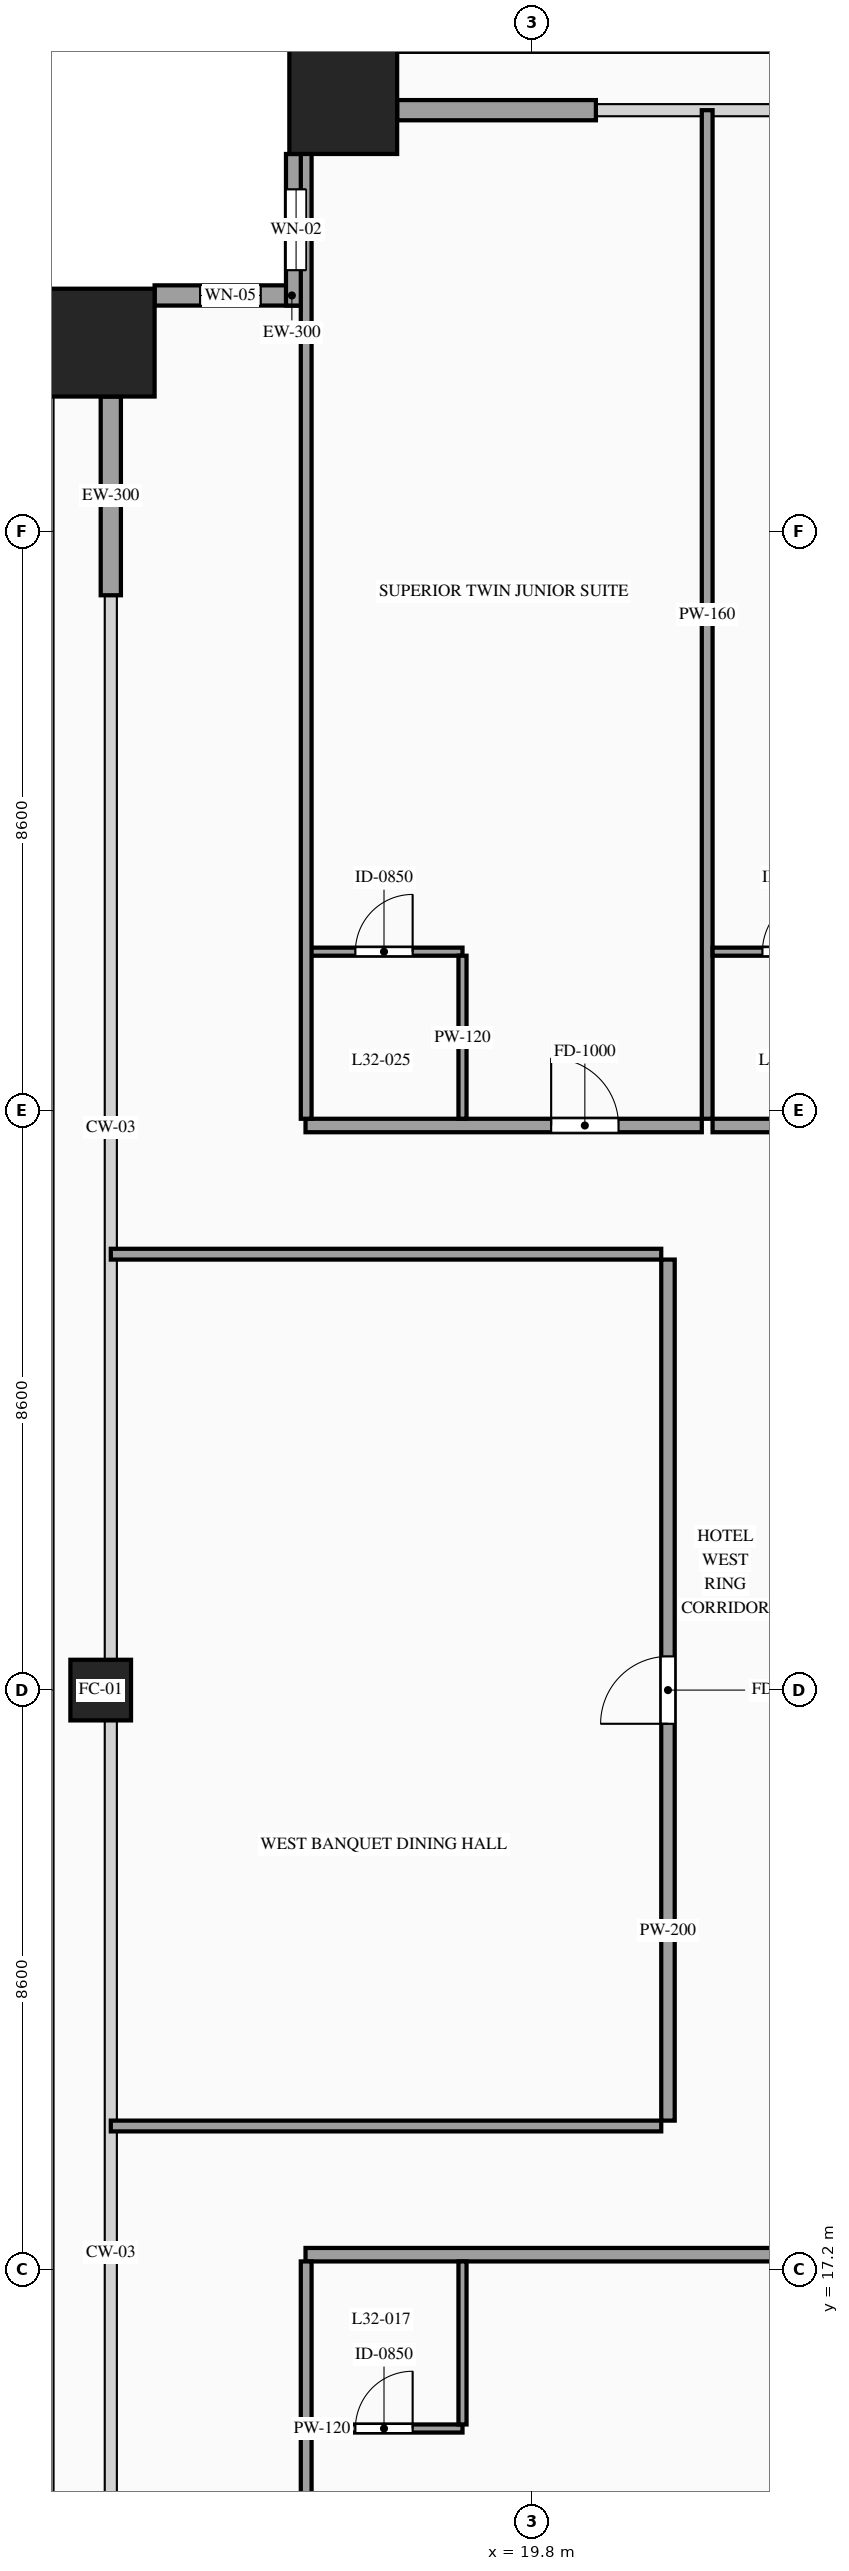
"""IFC4 building model, lengths in metres.
Left out: names, types, materials, properties, quantities, classifications, styles, units other than length and angle.
Written with IfcOpenShell. Run it as: python <this file> out.ifc"""

import sys

from ifc_helpers import new_model, si_unit, direction, frame, frame_2d, origin, origin_2d, place, context, subcontext, project, spatial, rectangle, hollow_rectangle, extrude, source, transform, mapped, element, fill, save


model = new_model("IFC4")
c1 = context("Model", 3, precision=1e-05, world=origin(), true_north=direction((0.0, 1.0)))
c2 = subcontext(c1, "Body", "Model", "MODEL_VIEW")
j1 = project(units=[si_unit("LENGTHUNIT", "METRE"), si_unit("PLANEANGLEUNIT", "RADIAN")], contexts=[c1])
p1 = place(None, origin())
s1 = spatial("IfcSite", under=j1, at=p1, CompositionType="ELEMENT")
p2 = place(p1, origin())
s2 = spatial("IfcBuilding", under=s1, at=p2, CompositionType="ELEMENT")
p3 = place(p2, frame((0.0, 0.0, 122.6)))
s3 = spatial("IfcBuildingStorey", under=s2, at=p3, CompositionType="ELEMENT", Elevation=122.6)
m1 = source(origin(), c2, "Body", "SweptSolid", [
    extrude(hollow_rectangle(XDim=1.6, YDim=1.6, WallThickness=0.07, at=origin_2d()), origin(), (0.0, 0.0, 1.0), 3.6),
])
p4 = place(p3, frame((17.0, 49.4, 0.0), z_axis=(0.0, 0.0, 1.0), x_axis=(1.0, 0.0, 0.0)))
e1 = element("IfcColumn", 1, at=p4, inside=s3, PredefinedType="COLUMN", context=c2, shape_type="MappedRepresentation", body=[
    mapped(m1, transform((0.0, 0.0, 0.0), scale=1.0)),
])
m2 = source(origin(), c2, "Body", "SweptSolid", [
    extrude(hollow_rectangle(XDim=0.9, YDim=0.9, WallThickness=0.042, at=origin_2d()), origin(), (0.0, 0.0, 1.0), 3.6),
])
p5 = place(p3, frame((13.4, 25.8, 0.0), z_axis=(0.0, 0.0, 1.0), x_axis=(1.0, 0.0, 0.0)))
e2 = element("IfcColumn", 2, at=p5, inside=s3, PredefinedType="COLUMN", context=c2, shape_type="MappedRepresentation", body=[
    mapped(m2, transform((0.0, 0.0, 0.0), scale=1.0)),
])
p6 = place(p3, frame((13.4, 45.8, 0.0), z_axis=(0.0, 0.0, 1.0), x_axis=(1.0, 0.0, 0.0)))
e3 = element("IfcColumn", 3, at=p6, inside=s3, PredefinedType="COLUMN", context=c2, shape_type="MappedRepresentation", body=[
    mapped(m1, transform((0.0, 0.0, 0.0), scale=1.0)),
])
p7 = place(p3, frame((16.45, 46.5, 0.0), z_axis=(0.0, 0.0, 1.0), x_axis=(-1.0, 0.0, 0.0)))
e4 = element("IfcWall", 4, at=p7, inside=s3, PredefinedType="SOLIDWALL", context=c2, shape_type="SweptSolid", body=[
    extrude(rectangle(XDim=2.25, YDim=0.3, at=frame_2d((1.125, 0.0))), origin(), (0.0, 0.0, 1.0), 3.38),
])
p8 = place(p7, frame((0.675, 0.0, 0.85)))
e5 = element("IfcOpeningElement", 5, at=p8, cuts=e4, PredefinedType="OPENING", context=c2, shape_type="SweptSolid", body=[
    extrude(rectangle(XDim=0.9, YDim=1.5, at=frame_2d((0.45, 0.75))), frame((0.0, 0.165, 0.0), z_axis=(0.0, -1.0, 0.0), x_axis=(1.0, 0.0, 0.0)), (0.0, 0.0, 1.0), 0.33),
])
p9 = place(p3, frame((16.3, 48.6, 0.0), z_axis=(0.0, 0.0, 1.0), x_axis=(0.0, -1.0, 0.0)))
e6 = element("IfcWall", 6, at=p9, inside=s3, PredefinedType="SOLIDWALL", context=c2, shape_type="SweptSolid", body=[
    extrude(rectangle(XDim=2.25, YDim=0.3, at=frame_2d((1.125, 0.0))), origin(), (0.0, 0.0, 1.0), 3.38),
])
p10 = place(p9, frame((0.525, 0.0, 0.85)))
e7 = element("IfcOpeningElement", 7, at=p10, cuts=e6, PredefinedType="OPENING", context=c2, shape_type="SweptSolid", body=[
    extrude(rectangle(XDim=1.2, YDim=2.1, at=frame_2d((0.6, 1.05))), frame((0.0, 0.165, 0.0), z_axis=(0.0, -1.0, 0.0), x_axis=(1.0, 0.0, 0.0)), (0.0, 0.0, 1.0), 0.33),
])
m3 = source(origin(), c2, "Body", "SweptSolid", [
    extrude(rectangle(XDim=2.95, YDim=0.3, at=frame_2d((1.475, 0.0))), origin(), (0.0, 0.0, 1.0), 2.775),
])
for number, where, z_axis, x_axis in (
    (8, (17.8, 49.25, 0.0), (0.0, 0.0, 1.0), (1.0, 0.0, 0.0)),
    (9, (13.55, 42.05, 0.0), (0.0, 0.0, 1.0), (0.0, 1.0, 0.0)),
):
    element("IfcWall", number, at=place(p3, frame(where, z_axis=z_axis, x_axis=x_axis)), inside=s3, PredefinedType="SOLIDWALL", context=c2, shape_type="MappedRepresentation", body=[
        mapped(m3, transform((0.0, 0.0, 0.0), scale=1.0)),
    ])
p11 = place(p3, frame((16.44, 17.42, 0.0), z_axis=(0.0, 0.0, 1.0), x_axis=(1.0, 0.0, 0.0)))
e10 = element("IfcWall", 10, at=p11, inside=s3, PredefinedType="PARTITIONING", context=c2, shape_type="SweptSolid", body=[
    extrude(rectangle(XDim=12.462, YDim=0.2, at=frame_2d((6.231, 0.0))), origin(), (0.0, 0.0, 1.0), 3.38),
])
p12 = place(p11, frame((6.936, 0.0, 0.0)))
e11 = element("IfcOpeningElement", 11, at=p12, cuts=e10, PredefinedType="OPENING", context=c2, shape_type="SweptSolid", body=[
    extrude(rectangle(XDim=1.0, YDim=2.2, at=frame_2d((0.5, 1.1))), frame((0.0, 0.115, 0.0), z_axis=(0.0, -1.0, 0.0), x_axis=(1.0, 0.0, 0.0)), (0.0, 0.0, 1.0), 0.23),
])
p13 = place(p3, frame((16.44, 14.84, 0.0), z_axis=(0.0, 0.0, 1.0), x_axis=(1.0, 0.0, 0.0)))
e12 = element("IfcWall", 12, at=p13, inside=s3, PredefinedType="PARTITIONING", context=c2, shape_type="SweptSolid", body=[
    extrude(rectangle(XDim=2.33, YDim=0.12, at=frame_2d((1.165, 0.0))), origin(), (0.0, 0.0, 1.0), 3.38),
])
p14 = place(p13, frame((0.74, 0.0, 0.0)))
e13 = element("IfcOpeningElement", 13, at=p14, cuts=e12, PredefinedType="OPENING", context=c2, shape_type="SweptSolid", body=[
    extrude(rectangle(XDim=0.85, YDim=2.1, at=frame_2d((0.425, 1.05))), frame((0.0, 0.075, 0.0), z_axis=(0.0, -1.0, 0.0), x_axis=(1.0, 0.0, 0.0)), (0.0, 0.0, 1.0), 0.15),
])
m4 = source(origin(), c2, "Body", "SweptSolid", [
    extrude(rectangle(XDim=2.42, YDim=0.12, at=frame_2d((1.21, 0.0))), origin(), (0.0, 0.0, 1.0), 3.38),
])
p15 = place(p3, frame((18.77, 14.9, 0.0), z_axis=(0.0, 0.0, 1.0), x_axis=(0.0, 1.0, 0.0)))
e14 = element("IfcWall", 14, at=p15, inside=s3, PredefinedType="PARTITIONING", context=c2, shape_type="MappedRepresentation", body=[
    mapped(m4, transform((0.0, 0.0, 0.0), scale=1.0)),
])
m5 = source(origin(), c2, "Body", "SweptSolid", [
    extrude(rectangle(XDim=14.82, YDim=0.16, at=frame_2d((7.41, 0.0))), origin(), (0.0, 0.0, 1.0), 3.38),
])
p16 = place(p3, frame((16.45, 2.5, 0.0), z_axis=(0.0, 0.0, 1.0), x_axis=(0.0, 1.0, 0.0)))
e15 = element("IfcWall", 15, at=p16, inside=s3, PredefinedType="PARTITIONING", context=c2, shape_type="MappedRepresentation", body=[
    mapped(m5, transform((0.0, 0.0, 0.0), scale=1.0)),
])
p17 = place(p3, frame((16.44, 34.18, 0.0), z_axis=(0.0, 0.0, 1.0), x_axis=(1.0, 0.0, 0.0)))
e16 = element("IfcWall", 16, at=p17, inside=s3, PredefinedType="PARTITIONING", context=c2, shape_type="SweptSolid", body=[
    extrude(rectangle(XDim=5.882, YDim=0.2, at=frame_2d((2.941, 0.0))), origin(), (0.0, 0.0, 1.0), 3.38),
])
p18 = place(p17, frame((3.646, 0.0, 0.0)))
e17 = element("IfcOpeningElement", 17, at=p18, cuts=e16, PredefinedType="OPENING", context=c2, shape_type="SweptSolid", body=[
    extrude(rectangle(XDim=1.0, YDim=2.2, at=frame_2d((0.5, 1.1))), frame((0.0, 0.115, 0.0), z_axis=(0.0, -1.0, 0.0), x_axis=(1.0, 0.0, 0.0)), (0.0, 0.0, 1.0), 0.23),
])
m6 = source(origin(), c2, "Body", "SweptSolid", [
    extrude(rectangle(XDim=14.97, YDim=0.16, at=frame_2d((7.485, 0.0))), origin(), (0.0, 0.0, 1.0), 3.38),
])
p19 = place(p3, frame((22.402, 34.28, 0.0), z_axis=(0.0, 0.0, 1.0), x_axis=(0.0, 1.0, 0.0)))
e18 = element("IfcWall", 18, at=p19, inside=s3, PredefinedType="PARTITIONING", context=c2, shape_type="MappedRepresentation", body=[
    mapped(m6, transform((0.0, 0.0, 0.0), scale=1.0)),
])
p20 = place(p3, frame((16.44, 36.76, 0.0), z_axis=(0.0, 0.0, 1.0), x_axis=(1.0, 0.0, 0.0)))
e19 = element("IfcWall", 19, at=p20, inside=s3, PredefinedType="PARTITIONING", context=c2, shape_type="SweptSolid", body=[
    extrude(rectangle(XDim=2.33, YDim=0.12, at=frame_2d((1.165, 0.0))), origin(), (0.0, 0.0, 1.0), 3.38),
])
p21 = place(p20, frame((0.74, 0.0, 0.0)))
e20 = element("IfcOpeningElement", 20, at=p21, cuts=e19, PredefinedType="OPENING", context=c2, shape_type="SweptSolid", body=[
    extrude(rectangle(XDim=0.85, YDim=2.1, at=frame_2d((0.425, 1.05))), frame((0.0, 0.075, 0.0), z_axis=(0.0, -1.0, 0.0), x_axis=(1.0, 0.0, 0.0)), (0.0, 0.0, 1.0), 0.15),
])
m7 = source(origin(), c2, "Body", "SweptSolid", [
    extrude(rectangle(XDim=2.42, YDim=0.12, at=frame_2d((1.21, 0.0))), origin(), (0.0, 0.0, 1.0), 3.38),
])
p22 = place(p3, frame((18.77, 34.28, 0.0), z_axis=(0.0, 0.0, 1.0), x_axis=(0.0, 1.0, 0.0)))
e21 = element("IfcWall", 21, at=p22, inside=s3, PredefinedType="PARTITIONING", context=c2, shape_type="MappedRepresentation", body=[
    mapped(m7, transform((0.0, 0.0, 0.0), scale=1.0)),
])
p23 = place(p3, frame((22.482, 34.18, 0.0), z_axis=(0.0, 0.0, 1.0), x_axis=(1.0, 0.0, 0.0)))
e22 = element("IfcWall", 22, at=p23, inside=s3, PredefinedType="PARTITIONING", context=c2, shape_type="SweptSolid", body=[
    extrude(rectangle(XDim=11.683, YDim=0.2, at=frame_2d((5.842, 0.0))), origin(), (0.0, 0.0, 1.0), 3.38),
])
p24 = place(p23, frame((6.547, 0.0, 0.0)))
e23 = element("IfcOpeningElement", 23, at=p24, cuts=e22, PredefinedType="OPENING", context=c2, shape_type="SweptSolid", body=[
    extrude(rectangle(XDim=1.0, YDim=2.2, at=frame_2d((0.5, 1.1))), frame((0.0, 0.115, 0.0), z_axis=(0.0, -1.0, 0.0), x_axis=(1.0, 0.0, 0.0)), (0.0, 0.0, 1.0), 0.23),
])
p25 = place(p3, frame((22.482, 36.76, 0.0), z_axis=(0.0, 0.0, 1.0), x_axis=(1.0, 0.0, 0.0)))
e24 = element("IfcWall", 24, at=p25, inside=s3, PredefinedType="PARTITIONING", context=c2, shape_type="SweptSolid", body=[
    extrude(rectangle(XDim=2.33, YDim=0.12, at=frame_2d((1.165, 0.0))), origin(), (0.0, 0.0, 1.0), 3.38),
])
p26 = place(p25, frame((0.74, 0.0, 0.0)))
e25 = element("IfcOpeningElement", 25, at=p26, cuts=e24, PredefinedType="OPENING", context=c2, shape_type="SweptSolid", body=[
    extrude(rectangle(XDim=0.85, YDim=2.1, at=frame_2d((0.425, 1.05))), frame((0.0, 0.075, 0.0), z_axis=(0.0, -1.0, 0.0), x_axis=(1.0, 0.0, 0.0)), (0.0, 0.0, 1.0), 0.15),
])
p27 = place(p3, frame((16.45, 34.28, 0.0), z_axis=(0.0, 0.0, 1.0), x_axis=(0.0, 1.0, 0.0)))
e26 = element("IfcWall", 26, at=p27, inside=s3, PredefinedType="PARTITIONING", context=c2, shape_type="MappedRepresentation", body=[
    mapped(m5, transform((0.0, 0.0, 0.0), scale=1.0)),
])
p28 = place(p3, frame((21.82, 19.41, 0.0), z_axis=(0.0, 0.0, 1.0), x_axis=(0.0, 1.0, 0.0)))
e27 = element("IfcWall", 27, at=p28, inside=s3, PredefinedType="PARTITIONING", context=c2, shape_type="SweptSolid", body=[
    extrude(rectangle(XDim=12.78, YDim=0.2, at=frame_2d((6.39, 0.0))), origin(), (0.0, 0.0, 1.0), 3.38),
])
p29 = place(p28, frame((5.89, 0.0, 0.0)))
e28 = element("IfcOpeningElement", 28, at=p29, cuts=e27, PredefinedType="OPENING", context=c2, shape_type="SweptSolid", body=[
    extrude(rectangle(XDim=1.0, YDim=2.2, at=frame_2d((0.5, 1.1))), frame((0.0, 0.115, 0.0), z_axis=(0.0, -1.0, 0.0), x_axis=(1.0, 0.0, 0.0)), (0.0, 0.0, 1.0), 0.23),
])
m8 = source(origin(), c2, "Body", "SweptSolid", [
    extrude(rectangle(XDim=8.17, YDim=0.16, at=frame_2d((4.085, 0.0))), origin(), (0.0, 0.0, 1.0), 2.875),
])
for number, where, z_axis, x_axis in (
    (29, (13.55, 19.33, 0.0), (0.0, 0.0, 1.0), (1.0, 0.0, 0.0)),
    (30, (13.55, 32.27, 0.0), (0.0, 0.0, 1.0), (1.0, 0.0, 0.0)),
):
    element("IfcWall", number, at=place(p3, frame(where, z_axis=z_axis, x_axis=x_axis)), inside=s3, PredefinedType="PARTITIONING", context=c2, shape_type="MappedRepresentation", body=[
        mapped(m8, transform((0.0, 0.0, 0.0), scale=1.0)),
    ])
m9 = source(origin(), c2, "Body", "SweptSolid", [
    extrude(rectangle(XDim=0.9, YDim=1.5, at=frame_2d((0.45, 0.75))), frame((0.0, 0.03, 0.0), z_axis=(0.0, -1.0, 0.0), x_axis=(1.0, 0.0, 0.0)), (0.0, 0.0, 1.0), 0.06),
])
p30 = place(p8, origin())
e31 = element("IfcWindow", 31, at=p30, inside=s3, PartitioningType="SINGLE_PANEL", PredefinedType="WINDOW", context=c2, shape_type="MappedRepresentation", body=[
    mapped(m9, transform((0.0, 0.0, 0.0), scale=1.0)),
])
fill(e5, e31)
m10 = source(origin(), c2, "Body", "SweptSolid", [
    extrude(rectangle(XDim=1.2, YDim=2.1, at=frame_2d((0.6, 1.05))), frame((0.0, 0.03, 0.0), z_axis=(0.0, -1.0, 0.0), x_axis=(1.0, 0.0, 0.0)), (0.0, 0.0, 1.0), 0.06),
])
p31 = place(p10, origin())
e32 = element("IfcWindow", 32, at=p31, inside=s3, PartitioningType="SINGLE_PANEL", PredefinedType="WINDOW", context=c2, shape_type="MappedRepresentation", body=[
    mapped(m10, transform((0.0, 0.0, 0.0), scale=1.0)),
])
fill(e7, e32)
m11 = source(origin(), c2, "Body", "SweptSolid", [
    extrude(rectangle(XDim=0.85, YDim=2.1, at=frame_2d((0.425, 1.05))), frame((0.0, 0.025, 0.0), z_axis=(0.0, -1.0, 0.0), x_axis=(1.0, 0.0, 0.0)), (0.0, 0.0, 1.0), 0.05),
])
p32 = place(p14, origin())
e33 = element("IfcDoor", 33, at=p32, inside=s3, OperationType="SINGLE_SWING_RIGHT", PredefinedType="DOOR", context=c2, shape_type="MappedRepresentation", body=[
    mapped(m11, transform((0.0, 0.0, 0.0), scale=1.0)),
])
fill(e13, e33)
m12 = source(origin(), c2, "Body", "SweptSolid", [
    extrude(rectangle(XDim=1.0, YDim=2.2, at=frame_2d((0.5, 1.1))), frame((0.0, 0.025, 0.0), z_axis=(0.0, -1.0, 0.0), x_axis=(1.0, 0.0, 0.0)), (0.0, 0.0, 1.0), 0.05),
])
p33 = place(p18, origin())
e34 = element("IfcDoor", 34, at=p33, inside=s3, OperationType="SINGLE_SWING_LEFT", PredefinedType="DOOR", context=c2, shape_type="MappedRepresentation", body=[
    mapped(m12, transform((0.0, 0.0, 0.0), scale=1.0)),
])
fill(e17, e34)
p34 = place(p21, origin())
e35 = element("IfcDoor", 35, at=p34, inside=s3, OperationType="SINGLE_SWING_RIGHT", PredefinedType="DOOR", context=c2, shape_type="MappedRepresentation", body=[
    mapped(m11, transform((0.0, 0.0, 0.0), scale=1.0)),
])
fill(e20, e35)
p35 = place(p26, origin())
e36 = element("IfcDoor", 36, at=p35, inside=s3, OperationType="SINGLE_SWING_RIGHT", PredefinedType="DOOR", context=c2, shape_type="MappedRepresentation", body=[
    mapped(m11, transform((0.0, 0.0, 0.0), scale=1.0)),
])
fill(e25, e36)
p36 = place(p29, origin())
e37 = element("IfcDoor", 37, at=p36, inside=s3, OperationType="SINGLE_SWING_LEFT", PredefinedType="DOOR", context=c2, shape_type="MappedRepresentation", body=[
    mapped(m12, transform((0.0, 0.0, 0.0), scale=1.0)),
])
fill(e28, e37)
save(model, sys.argv[1])
